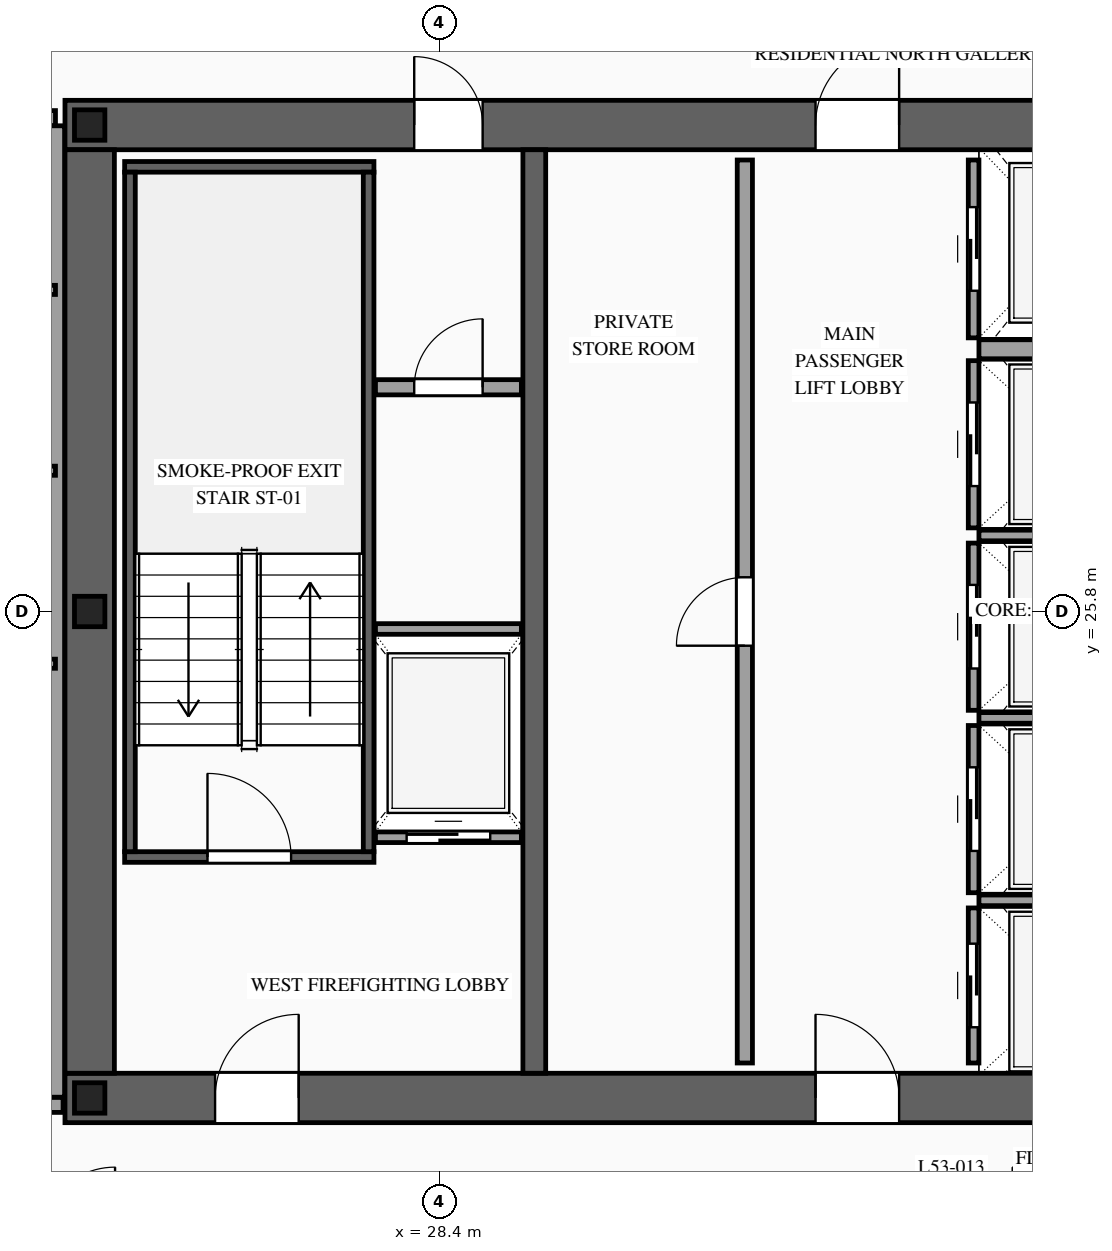
"""IFC4 building model, lengths in metres.
Left out: names, types, materials, properties, quantities, classifications, styles, units other than length and angle.
Written with IfcOpenShell. Run it as: python <this file> out.ifc"""

import sys

from ifc_helpers import new_model, si_unit, direction, frame, frame_2d, origin, origin_2d, place, context, subcontext, project, spatial, rectangle, i_section, extrude, source, transform, mapped, element, fill, save


model = new_model("IFC4")
c1 = context("Model", 3, precision=1e-05, world=origin(), true_north=direction((0.0, 1.0)))
c2 = subcontext(c1, "Body", "Model", "MODEL_VIEW")
j1 = project(units=[si_unit("LENGTHUNIT", "METRE"), si_unit("PLANEANGLEUNIT", "RADIAN")], contexts=[c1])
p1 = place(None, origin())
s1 = spatial("IfcSite", under=j1, at=p1, CompositionType="ELEMENT")
p2 = place(p1, origin())
s2 = spatial("IfcBuilding", under=s1, at=p2, CompositionType="ELEMENT")
p3 = place(p2, frame((0.0, 0.0, 202.0)))
s3 = spatial("IfcBuildingStorey", under=s2, at=p3, CompositionType="ELEMENT", Elevation=202.0)
p4 = place(p3, frame((23.475, 19.4, 0.0), z_axis=(0.0, 0.0, 1.0), x_axis=(1.0, 0.0, 0.0)))
e1 = element("IfcWall", 1, at=p4, inside=s3, PredefinedType="SHEAR", context=c2, shape_type="SweptSolid", body=[
    extrude(rectangle(XDim=27.05, YDim=0.65, at=frame_2d((13.525, 0.0))), origin(), (0.0, 0.0, 1.0), 3.5),
])
p5 = place(p4, frame((1.975, 0.0, 0.0)))
e2 = element("IfcOpeningElement", 2, at=p5, cuts=e1, PredefinedType="OPENING", context=c2, shape_type="SweptSolid", body=[
    extrude(rectangle(XDim=1.1, YDim=2.2, at=frame_2d((0.55, 1.1))), frame((0.0, 0.34, 0.0), z_axis=(0.0, -1.0, 0.0), x_axis=(1.0, 0.0, 0.0)), (0.0, 0.0, 1.0), 0.68),
])
p6 = place(p4, frame((9.875, 0.0, 0.0)))
e3 = element("IfcOpeningElement", 3, at=p6, cuts=e1, PredefinedType="OPENING", context=c2, shape_type="SweptSolid", body=[
    extrude(rectangle(XDim=1.1, YDim=2.2, at=frame_2d((0.55, 1.1))), frame((0.0, 0.34, 0.0), z_axis=(0.0, -1.0, 0.0), x_axis=(1.0, 0.0, 0.0)), (0.0, 0.0, 1.0), 0.68),
])
p7 = place(p4, frame((23.075, 0.0, 0.0)))
e4 = element("IfcOpeningElement", 4, at=p7, cuts=e1, PredefinedType="OPENING", context=c2, shape_type="SweptSolid", body=[
    extrude(rectangle(XDim=1.1, YDim=2.2, at=frame_2d((0.55, 1.1))), frame((0.0, 0.34, 0.0), z_axis=(0.0, -1.0, 0.0), x_axis=(1.0, 0.0, 0.0)), (0.0, 0.0, 1.0), 0.68),
])
p8 = place(p4, frame((19.695, 0.0, 0.0)))
e5 = element("IfcOpeningElement", 5, at=p8, cuts=e1, PredefinedType="OPENING", context=c2, shape_type="SweptSolid", body=[
    extrude(rectangle(XDim=0.9, YDim=2.15, at=frame_2d((0.45, 1.075))), frame((0.0, 0.34, 0.0), z_axis=(0.0, -1.0, 0.0), x_axis=(1.0, 0.0, 0.0)), (0.0, 0.0, 1.0), 0.68),
])
p9 = place(p4, frame((18.255, 0.0, 0.0)))
e6 = element("IfcOpeningElement", 6, at=p9, cuts=e1, PredefinedType="OPENING", context=c2, shape_type="SweptSolid", body=[
    extrude(rectangle(XDim=0.9, YDim=2.15, at=frame_2d((0.45, 1.075))), frame((0.0, 0.34, 0.0), z_axis=(0.0, -1.0, 0.0), x_axis=(1.0, 0.0, 0.0)), (0.0, 0.0, 1.0), 0.68),
])
p10 = place(p3, frame((23.475, 32.2, 0.0), z_axis=(0.0, 0.0, 1.0), x_axis=(1.0, 0.0, 0.0)))
e7 = element("IfcWall", 7, at=p10, inside=s3, PredefinedType="SHEAR", context=c2, shape_type="SweptSolid", body=[
    extrude(rectangle(XDim=27.05, YDim=0.65, at=frame_2d((13.525, 0.0))), origin(), (0.0, 0.0, 1.0), 3.5),
])
p11 = place(p10, frame((4.595, 0.0, 0.0)))
e8 = element("IfcOpeningElement", 8, at=p11, cuts=e7, PredefinedType="OPENING", context=c2, shape_type="SweptSolid", body=[
    extrude(rectangle(XDim=0.9, YDim=2.15, at=frame_2d((0.45, 1.075))), frame((0.0, 0.34, 0.0), z_axis=(0.0, -1.0, 0.0), x_axis=(1.0, 0.0, 0.0)), (0.0, 0.0, 1.0), 0.68),
])
p12 = place(p10, frame((9.875, 0.0, 0.0)))
e9 = element("IfcOpeningElement", 9, at=p12, cuts=e7, PredefinedType="OPENING", context=c2, shape_type="SweptSolid", body=[
    extrude(rectangle(XDim=1.1, YDim=2.2, at=frame_2d((0.55, 1.1))), frame((0.0, 0.34, 0.0), z_axis=(0.0, -1.0, 0.0), x_axis=(1.0, 0.0, 0.0)), (0.0, 0.0, 1.0), 0.68),
])
p13 = place(p10, frame((15.725, 0.0, 0.0)))
e10 = element("IfcOpeningElement", 10, at=p13, cuts=e7, PredefinedType="OPENING", context=c2, shape_type="SweptSolid", body=[
    extrude(rectangle(XDim=1.1, YDim=2.2, at=frame_2d((0.55, 1.1))), frame((0.0, 0.34, 0.0), z_axis=(0.0, -1.0, 0.0), x_axis=(1.0, 0.0, 0.0)), (0.0, 0.0, 1.0), 0.68),
])
m1 = source(origin(), c2, "Body", "SweptSolid", [
    extrude(rectangle(XDim=12.15, YDim=0.65, at=frame_2d((6.075, 0.0))), origin(), (0.0, 0.0, 1.0), 3.5),
])
p14 = place(p3, frame((23.8, 19.725, 0.0), z_axis=(0.0, 0.0, 1.0), x_axis=(0.0, 1.0, 0.0)))
e11 = element("IfcWall", 11, at=p14, inside=s3, PredefinedType="SHEAR", context=c2, shape_type="MappedRepresentation", body=[
    mapped(m1, transform((0.0, 0.0, 0.0), scale=1.0)),
])
m2 = source(origin(), c2, "Body", "SweptSolid", [
    extrude(rectangle(XDim=12.15, YDim=0.3, at=frame_2d((6.075, 0.0))), origin(), (0.0, 0.0, 1.0), 3.5),
])
p15 = place(p3, frame((29.65, 19.725, 0.0), z_axis=(0.0, 0.0, 1.0), x_axis=(0.0, 1.0, 0.0)))
e12 = element("IfcWall", 12, at=p15, inside=s3, PredefinedType="SOLIDWALL", context=c2, shape_type="MappedRepresentation", body=[
    mapped(m2, transform((0.0, 0.0, 0.0), scale=1.0)),
])
m3 = source(origin(), c2, "Body", "SweptSolid", [
    extrude(i_section(OverallWidth=0.4, OverallDepth=0.4, WebThickness=0.013, FlangeThickness=0.021, at=origin_2d()), origin(), (0.0, 0.0, 1.0), 3.5),
])
for number, where, z_axis, x_axis in (
    (13, (23.8, 19.4, 0.0), (0.0, 0.0, 1.0), (1.0, 0.0, 0.0)),
    (14, (23.8, 25.8, 0.0), (0.0, 0.0, 1.0), (1.0, 0.0, 0.0)),
    (15, (23.8, 32.2, 0.0), (0.0, 0.0, 1.0), (1.0, 0.0, 0.0)),
):
    element("IfcColumn", number, at=place(p3, frame(where, z_axis=z_axis, x_axis=x_axis)), inside=s3, PredefinedType="COLUMN", context=c2, shape_type="MappedRepresentation", body=[
        mapped(m3, transform((0.0, 0.0, 0.0), scale=1.0)),
    ])
p16 = place(p3, frame((27.56, 22.83, 0.0), z_axis=(0.0, 0.0, 1.0), x_axis=(1.0, 0.0, 0.0)))
e16 = element("IfcWall", 16, at=p16, inside=s3, PredefinedType="SOLIDWALL", context=c2, shape_type="SweptSolid", body=[
    extrude(rectangle(XDim=1.92, YDim=0.14, at=frame_2d((0.96, 0.0))), origin(), (0.0, 0.0, 1.0), 3.28),
])
p17 = place(p16, frame((0.41, 0.0, 0.0)))
e17 = element("IfcOpeningElement", 17, at=p17, cuts=e16, PredefinedType="OPENING", context=c2, shape_type="SweptSolid", body=[
    extrude(rectangle(XDim=1.1, YDim=2.2, at=frame_2d((0.55, 1.1))), frame((0.0, 0.085, 0.0), z_axis=(0.0, -1.0, 0.0), x_axis=(1.0, 0.0, 0.0)), (0.0, 0.0, 1.0), 0.17),
])
m4 = source(origin(), c2, "Body", "SweptSolid", [
    extrude(rectangle(XDim=1.92, YDim=0.14, at=frame_2d((0.96, 0.0))), origin(), (0.0, 0.0, 1.0), 3.28),
])
p18 = place(p3, frame((27.56, 25.57, 0.0), z_axis=(0.0, 0.0, 1.0), x_axis=(1.0, 0.0, 0.0)))
e18 = element("IfcWall", 18, at=p18, inside=s3, PredefinedType="SOLIDWALL", context=c2, shape_type="MappedRepresentation", body=[
    mapped(m4, transform((0.0, 0.0, 0.0), scale=1.0)),
])
p19 = place(p3, frame((35.43, 19.86, 0.0), z_axis=(0.0, 0.0, 1.0), x_axis=(0.0, 1.0, 0.0)))
e19 = element("IfcWall", 19, at=p19, inside=s3, PredefinedType="SOLIDWALL", context=c2, shape_type="SweptSolid", body=[
    extrude(rectangle(XDim=2.04, YDim=0.14, at=frame_2d((1.02, 0.0))), origin(), (0.0, 0.0, 1.0), 3.28),
])
p20 = place(p19, frame((0.47, 0.0, 0.0)))
e20 = element("IfcOpeningElement", 20, at=p20, cuts=e19, PredefinedType="OPENING", context=c2, shape_type="SweptSolid", body=[
    extrude(rectangle(XDim=1.1, YDim=2.2, at=frame_2d((0.55, 1.1))), frame((0.0, 0.085, 0.0), z_axis=(0.0, -1.0, 0.0), x_axis=(1.0, 0.0, 0.0)), (0.0, 0.0, 1.0), 0.17),
])
m5 = source(origin(), c2, "Body", "SweptSolid", [
    extrude(rectangle(XDim=2.4, YDim=0.14, at=frame_2d((1.2, 0.0))), origin(), (0.0, 0.0, 1.0), 3.28),
])
p21 = place(p3, frame((35.5, 22.0, 0.0), z_axis=(0.0, 0.0, 1.0), x_axis=(1.0, 0.0, 0.0)))
e21 = element("IfcWall", 21, at=p21, inside=s3, PredefinedType="SOLIDWALL", context=c2, shape_type="MappedRepresentation", body=[
    mapped(m5, transform((0.0, 0.0, 0.0), scale=1.0)),
])
p22 = place(p3, frame((35.43, 22.1, 0.0), z_axis=(0.0, 0.0, 1.0), x_axis=(0.0, 1.0, 0.0)))
e22 = element("IfcWall", 22, at=p22, inside=s3, PredefinedType="SOLIDWALL", context=c2, shape_type="SweptSolid", body=[
    extrude(rectangle(XDim=2.2, YDim=0.14, at=frame_2d((1.1, 0.0))), origin(), (0.0, 0.0, 1.0), 3.28),
])
p23 = place(p22, frame((0.55, 0.0, 0.0)))
e23 = element("IfcOpeningElement", 23, at=p23, cuts=e22, PredefinedType="OPENING", context=c2, shape_type="SweptSolid", body=[
    extrude(rectangle(XDim=1.1, YDim=2.2, at=frame_2d((0.55, 1.1))), frame((0.0, 0.085, 0.0), z_axis=(0.0, -1.0, 0.0), x_axis=(1.0, 0.0, 0.0)), (0.0, 0.0, 1.0), 0.17),
])
p24 = place(p3, frame((35.5, 24.4, 0.0), z_axis=(0.0, 0.0, 1.0), x_axis=(1.0, 0.0, 0.0)))
e24 = element("IfcWall", 24, at=p24, inside=s3, PredefinedType="SOLIDWALL", context=c2, shape_type="MappedRepresentation", body=[
    mapped(m5, transform((0.0, 0.0, 0.0), scale=1.0)),
])
p25 = place(p3, frame((35.43, 24.5, 0.0), z_axis=(0.0, 0.0, 1.0), x_axis=(0.0, 1.0, 0.0)))
e25 = element("IfcWall", 25, at=p25, inside=s3, PredefinedType="SOLIDWALL", context=c2, shape_type="SweptSolid", body=[
    extrude(rectangle(XDim=2.2, YDim=0.14, at=frame_2d((1.1, 0.0))), origin(), (0.0, 0.0, 1.0), 3.28),
])
p26 = place(p25, frame((0.55, 0.0, 0.0)))
e26 = element("IfcOpeningElement", 26, at=p26, cuts=e25, PredefinedType="OPENING", context=c2, shape_type="SweptSolid", body=[
    extrude(rectangle(XDim=1.1, YDim=2.2, at=frame_2d((0.55, 1.1))), frame((0.0, 0.085, 0.0), z_axis=(0.0, -1.0, 0.0), x_axis=(1.0, 0.0, 0.0)), (0.0, 0.0, 1.0), 0.17),
])
p27 = place(p3, frame((35.5, 26.8, 0.0), z_axis=(0.0, 0.0, 1.0), x_axis=(1.0, 0.0, 0.0)))
e27 = element("IfcWall", 27, at=p27, inside=s3, PredefinedType="SOLIDWALL", context=c2, shape_type="MappedRepresentation", body=[
    mapped(m5, transform((0.0, 0.0, 0.0), scale=1.0)),
])
p28 = place(p3, frame((35.43, 26.9, 0.0), z_axis=(0.0, 0.0, 1.0), x_axis=(0.0, 1.0, 0.0)))
e28 = element("IfcWall", 28, at=p28, inside=s3, PredefinedType="SOLIDWALL", context=c2, shape_type="SweptSolid", body=[
    extrude(rectangle(XDim=2.2, YDim=0.14, at=frame_2d((1.1, 0.0))), origin(), (0.0, 0.0, 1.0), 3.28),
])
p29 = place(p28, frame((0.55, 0.0, 0.0)))
e29 = element("IfcOpeningElement", 29, at=p29, cuts=e28, PredefinedType="OPENING", context=c2, shape_type="SweptSolid", body=[
    extrude(rectangle(XDim=1.1, YDim=2.2, at=frame_2d((0.55, 1.1))), frame((0.0, 0.085, 0.0), z_axis=(0.0, -1.0, 0.0), x_axis=(1.0, 0.0, 0.0)), (0.0, 0.0, 1.0), 0.17),
])
p30 = place(p3, frame((35.43, 29.4, 0.0), z_axis=(0.0, 0.0, 1.0), x_axis=(0.0, 1.0, 0.0)))
e30 = element("IfcWall", 30, at=p30, inside=s3, PredefinedType="SOLIDWALL", context=c2, shape_type="SweptSolid", body=[
    extrude(rectangle(XDim=2.34, YDim=0.14, at=frame_2d((1.17, 0.0))), origin(), (0.0, 0.0, 1.0), 3.28),
])
p31 = place(p30, frame((0.62, 0.0, 0.0)))
e31 = element("IfcOpeningElement", 31, at=p31, cuts=e30, PredefinedType="OPENING", context=c2, shape_type="SweptSolid", body=[
    extrude(rectangle(XDim=1.1, YDim=2.2, at=frame_2d((0.55, 1.1))), frame((0.0, 0.085, 0.0), z_axis=(0.0, -1.0, 0.0), x_axis=(1.0, 0.0, 0.0)), (0.0, 0.0, 1.0), 0.17),
])
m6 = source(origin(), c2, "Body", "SweptSolid", [
    extrude(rectangle(XDim=2.4, YDim=0.25, at=frame_2d((1.2, 0.0))), origin(), (0.0, 0.0, 1.0), 3.28),
])
p32 = place(p3, frame((35.5, 29.25, 0.0), z_axis=(0.0, 0.0, 1.0), x_axis=(1.0, 0.0, 0.0)))
e32 = element("IfcWall", 32, at=p32, inside=s3, PredefinedType="SOLIDWALL", context=c2, shape_type="MappedRepresentation", body=[
    mapped(m6, transform((0.0, 0.0, 0.0), scale=1.0)),
])
p33 = place(p3, frame((24.26, 22.57, 0.0), z_axis=(0.0, 0.0, 1.0), x_axis=(1.0, 0.0, 0.0)))
e33 = element("IfcWall", 33, at=p33, inside=s3, PredefinedType="SOLIDWALL", context=c2, shape_type="SweptSolid", body=[
    extrude(rectangle(XDim=3.28, YDim=0.14, at=frame_2d((1.64, 0.0))), origin(), (0.0, 0.0, 1.0), 3.28),
])
p34 = place(p33, frame((1.09, 0.0, 0.0)))
e34 = element("IfcOpeningElement", 34, at=p34, cuts=e33, PredefinedType="OPENING", context=c2, shape_type="SweptSolid", body=[
    extrude(rectangle(XDim=1.1, YDim=2.2, at=frame_2d((0.55, 1.1))), frame((0.0, 0.085, 0.0), z_axis=(0.0, -1.0, 0.0), x_axis=(1.0, 0.0, 0.0)), (0.0, 0.0, 1.0), 0.17),
])
m7 = source(origin(), c2, "Body", "SweptSolid", [
    extrude(rectangle(XDim=3.28, YDim=0.14, at=frame_2d((1.64, 0.0))), origin(), (0.0, 0.0, 1.0), 3.28),
])
p35 = place(p3, frame((24.26, 31.65, 0.0), z_axis=(0.0, 0.0, 1.0), x_axis=(1.0, 0.0, 0.0)))
e35 = element("IfcWall", 35, at=p35, inside=s3, PredefinedType="SOLIDWALL", context=c2, shape_type="MappedRepresentation", body=[
    mapped(m7, transform((0.0, 0.0, 0.0), scale=1.0)),
])
m8 = source(origin(), c2, "Body", "SweptSolid", [
    extrude(rectangle(XDim=8.94, YDim=0.14, at=frame_2d((4.47, 0.0))), origin(), (0.0, 0.0, 1.0), 3.28),
])
for number, where, z_axis, x_axis in (
    (36, (24.33, 22.64, 0.0), (0.0, 0.0, 1.0), (0.0, 1.0, 0.0)),
    (37, (27.47, 22.64, 0.0), (0.0, 0.0, 1.0), (0.0, 1.0, 0.0)),
):
    element("IfcWall", number, at=place(p3, frame(where, z_axis=z_axis, x_axis=x_axis)), inside=s3, PredefinedType="SOLIDWALL", context=c2, shape_type="MappedRepresentation", body=[
        mapped(m8, transform((0.0, 0.0, 0.0), scale=1.0)),
    ])
p36 = place(p3, frame((27.56, 28.75, 0.0), z_axis=(0.0, 0.0, 1.0), x_axis=(1.0, 0.0, 0.0)))
e38 = element("IfcWall", 38, at=p36, inside=s3, PredefinedType="PARTITIONING", context=c2, shape_type="SweptSolid", body=[
    extrude(rectangle(XDim=1.92, YDim=0.2, at=frame_2d((0.96, 0.0))), origin(), (0.0, 0.0, 1.0), 3.28),
])
p37 = place(p36, frame((0.51, 0.0, 0.0)))
e39 = element("IfcOpeningElement", 39, at=p37, cuts=e38, PredefinedType="OPENING", context=c2, shape_type="SweptSolid", body=[
    extrude(rectangle(XDim=0.9, YDim=2.15, at=frame_2d((0.45, 1.075))), frame((0.0, 0.115, 0.0), z_axis=(0.0, -1.0, 0.0), x_axis=(1.0, 0.0, 0.0)), (0.0, 0.0, 1.0), 0.23),
])
p38 = place(p3, frame((32.42, 19.86, 0.0), z_axis=(0.0, 0.0, 1.0), x_axis=(0.0, 1.0, 0.0)))
e40 = element("IfcWall", 40, at=p38, inside=s3, PredefinedType="PARTITIONING", context=c2, shape_type="SweptSolid", body=[
    extrude(rectangle(XDim=11.88, YDim=0.2, at=frame_2d((5.94, 0.0))), origin(), (0.0, 0.0, 1.0), 3.28),
])
p39 = place(p38, frame((5.49, 0.0, 0.0)))
e41 = element("IfcOpeningElement", 41, at=p39, cuts=e40, PredefinedType="OPENING", context=c2, shape_type="SweptSolid", body=[
    extrude(rectangle(XDim=0.9, YDim=2.15, at=frame_2d((0.45, 1.075))), frame((0.0, 0.115, 0.0), z_axis=(0.0, -1.0, 0.0), x_axis=(1.0, 0.0, 0.0)), (0.0, 0.0, 1.0), 0.23),
])
p40 = place(p3, frame((15.05, 32.29, 0.0), z_axis=(0.0, 0.0, 1.0), x_axis=(1.0, 0.0, 0.0)))
e42 = element("IfcWall", 42, at=p40, inside=s3, PredefinedType="PARTITIONING", context=c2, shape_type="SweptSolid", body=[
    extrude(rectangle(XDim=8.3, YDim=0.2, at=frame_2d((4.15, 0.0))), origin(), (0.0, 0.0, 1.0), 2.775),
])
p41 = place(p40, frame((3.715, 0.0, 0.0)))
e43 = element("IfcOpeningElement", 43, at=p41, cuts=e42, PredefinedType="OPENING", context=c2, shape_type="SweptSolid", body=[
    extrude(rectangle(XDim=1.0, YDim=2.2, at=frame_2d((0.5, 1.1))), frame((0.0, 0.115, 0.0), z_axis=(0.0, -1.0, 0.0), x_axis=(1.0, 0.0, 0.0)), (0.0, 0.0, 1.0), 0.23),
])
m9 = source(origin(), c2, "Body", "SweptSolid", [
    extrude(rectangle(XDim=8.4, YDim=0.2, at=frame_2d((4.2, 0.0))), origin(), (0.0, 0.0, 1.0), 2.775),
])
p42 = place(p3, frame((15.05, 19.31, 0.0), z_axis=(0.0, 0.0, 1.0), x_axis=(1.0, 0.0, 0.0)))
e44 = element("IfcWall", 44, at=p42, inside=s3, PredefinedType="PARTITIONING", context=c2, shape_type="MappedRepresentation", body=[
    mapped(m9, transform((0.0, 0.0, 0.0), scale=1.0)),
])
m10 = source(origin(), c2, "Body", "SweptSolid", [
    extrude(rectangle(XDim=12.78, YDim=0.2, at=frame_2d((6.39, 0.0))), origin(), (0.0, 0.0, 1.0), 3.28),
])
p43 = place(p3, frame((23.37, 19.41, 0.0), z_axis=(0.0, 0.0, 1.0), x_axis=(0.0, 1.0, 0.0)))
e45 = element("IfcWall", 45, at=p43, inside=s3, PredefinedType="PARTITIONING", context=c2, shape_type="MappedRepresentation", body=[
    mapped(m10, transform((0.0, 0.0, 0.0), scale=1.0)),
])
m11 = source(origin(), c2, "Body", "SweptSolid", [
    extrude(rectangle(XDim=2.75, YDim=0.12, at=frame_2d((1.375, 0.0))), origin(), (0.0, 0.0, 1.0), 3.28),
])
for number, where, z_axis, x_axis in (
    (46, (20.6, 25.113, 0.0), (0.0, 0.0, 1.0), (1.0, 0.0, 0.0)),
    (47, (20.6, 27.652, 0.0), (0.0, 0.0, 1.0), (1.0, 0.0, 0.0)),
    (48, (20.6, 30.031, 0.0), (0.0, 0.0, 1.0), (1.0, 0.0, 0.0)),
):
    element("IfcWall", number, at=place(p3, frame(where, z_axis=z_axis, x_axis=x_axis)), inside=s3, PredefinedType="PARTITIONING", context=c2, shape_type="MappedRepresentation", body=[
        mapped(m11, transform((0.0, 0.0, 0.0), scale=1.0)),
    ])
m12 = source(origin(), c2, "Body", "SweptSolid", [
    extrude(rectangle(XDim=1.1, YDim=2.2, at=frame_2d((0.55, 1.1))), frame((0.0, 0.025, 0.0), z_axis=(0.0, -1.0, 0.0), x_axis=(1.0, 0.0, 0.0)), (0.0, 0.0, 1.0), 0.05),
])
p44 = place(p17, origin())
e49 = element("IfcDoor", 49, at=p44, inside=s3, OperationType="SLIDING_TO_LEFT", PredefinedType="DOOR", context=c2, shape_type="MappedRepresentation", body=[
    mapped(m12, transform((0.0, 0.0, 0.0), scale=1.0)),
])
fill(e17, e49)
p45 = place(p20, origin())
e50 = element("IfcDoor", 50, at=p45, inside=s3, OperationType="SLIDING_TO_RIGHT", PredefinedType="DOOR", context=c2, shape_type="MappedRepresentation", body=[
    mapped(m12, transform((0.0, 0.0, 0.0), scale=1.0)),
])
fill(e20, e50)
p46 = place(p23, origin())
e51 = element("IfcDoor", 51, at=p46, inside=s3, OperationType="SLIDING_TO_LEFT", PredefinedType="DOOR", context=c2, shape_type="MappedRepresentation", body=[
    mapped(m12, transform((0.0, 0.0, 0.0), scale=1.0)),
])
fill(e23, e51)
p47 = place(p26, origin())
e52 = element("IfcDoor", 52, at=p47, inside=s3, OperationType="SLIDING_TO_RIGHT", PredefinedType="DOOR", context=c2, shape_type="MappedRepresentation", body=[
    mapped(m12, transform((0.0, 0.0, 0.0), scale=1.0)),
])
fill(e26, e52)
p48 = place(p29, origin())
e53 = element("IfcDoor", 53, at=p48, inside=s3, OperationType="SLIDING_TO_LEFT", PredefinedType="DOOR", context=c2, shape_type="MappedRepresentation", body=[
    mapped(m12, transform((0.0, 0.0, 0.0), scale=1.0)),
])
fill(e29, e53)
p49 = place(p31, origin())
e54 = element("IfcDoor", 54, at=p49, inside=s3, OperationType="SLIDING_TO_RIGHT", PredefinedType="DOOR", context=c2, shape_type="MappedRepresentation", body=[
    mapped(m12, transform((0.0, 0.0, 0.0), scale=1.0)),
])
fill(e31, e54)
m13 = source(origin(), c2, "Body", "SweptSolid", [
    extrude(rectangle(XDim=1.1, YDim=2.2, at=frame_2d((0.55, 1.1))), frame((0.0, 0.025, 0.0), z_axis=(0.0, -1.0, 0.0), x_axis=(1.0, 0.0, 0.0)), (0.0, 0.0, 1.0), 0.05),
])
p50 = place(p34, origin())
e55 = element("IfcDoor", 55, at=p50, inside=s3, OperationType="SINGLE_SWING_LEFT", PredefinedType="DOOR", context=c2, shape_type="MappedRepresentation", body=[
    mapped(m13, transform((0.0, 0.0, 0.0), scale=1.0)),
])
fill(e34, e55)
p51 = place(p5, origin())
e56 = element("IfcDoor", 56, at=p51, inside=s3, OperationType="SINGLE_SWING_RIGHT", PredefinedType="DOOR", context=c2, shape_type="MappedRepresentation", body=[
    mapped(m13, transform((0.0, 0.0, 0.0), scale=1.0)),
])
fill(e2, e56)
p52 = place(p6, origin())
e57 = element("IfcDoor", 57, at=p52, inside=s3, OperationType="SINGLE_SWING_LEFT", PredefinedType="DOOR", context=c2, shape_type="MappedRepresentation", body=[
    mapped(m13, transform((0.0, 0.0, 0.0), scale=1.0)),
])
fill(e3, e57)
m14 = source(origin(), c2, "Body", "SweptSolid", [
    extrude(rectangle(XDim=0.9, YDim=2.15, at=frame_2d((0.45, 1.075))), frame((0.0, 0.025, 0.0), z_axis=(0.0, -1.0, 0.0), x_axis=(1.0, 0.0, 0.0)), (0.0, 0.0, 1.0), 0.05),
])
p53 = place(p11, origin())
e58 = element("IfcDoor", 58, at=p53, inside=s3, OperationType="SINGLE_SWING_LEFT", PredefinedType="DOOR", context=c2, shape_type="MappedRepresentation", body=[
    mapped(m14, transform((0.0, 0.0, 0.0), scale=1.0)),
])
fill(e8, e58)
p54 = place(p12, origin())
e59 = element("IfcDoor", 59, at=p54, inside=s3, OperationType="SINGLE_SWING_RIGHT", PredefinedType="DOOR", context=c2, shape_type="MappedRepresentation", body=[
    mapped(m13, transform((0.0, 0.0, 0.0), scale=1.0)),
])
fill(e9, e59)
p55 = place(p37, origin())
e60 = element("IfcDoor", 60, at=p55, inside=s3, OperationType="SINGLE_SWING_RIGHT", PredefinedType="DOOR", context=c2, shape_type="MappedRepresentation", body=[
    mapped(m14, transform((0.0, 0.0, 0.0), scale=1.0)),
])
fill(e39, e60)
p56 = place(p39, origin())
e61 = element("IfcDoor", 61, at=p56, inside=s3, OperationType="SINGLE_SWING_LEFT", PredefinedType="DOOR", context=c2, shape_type="MappedRepresentation", body=[
    mapped(m14, transform((0.0, 0.0, 0.0), scale=1.0)),
])
fill(e41, e61)
save(model, sys.argv[1])
